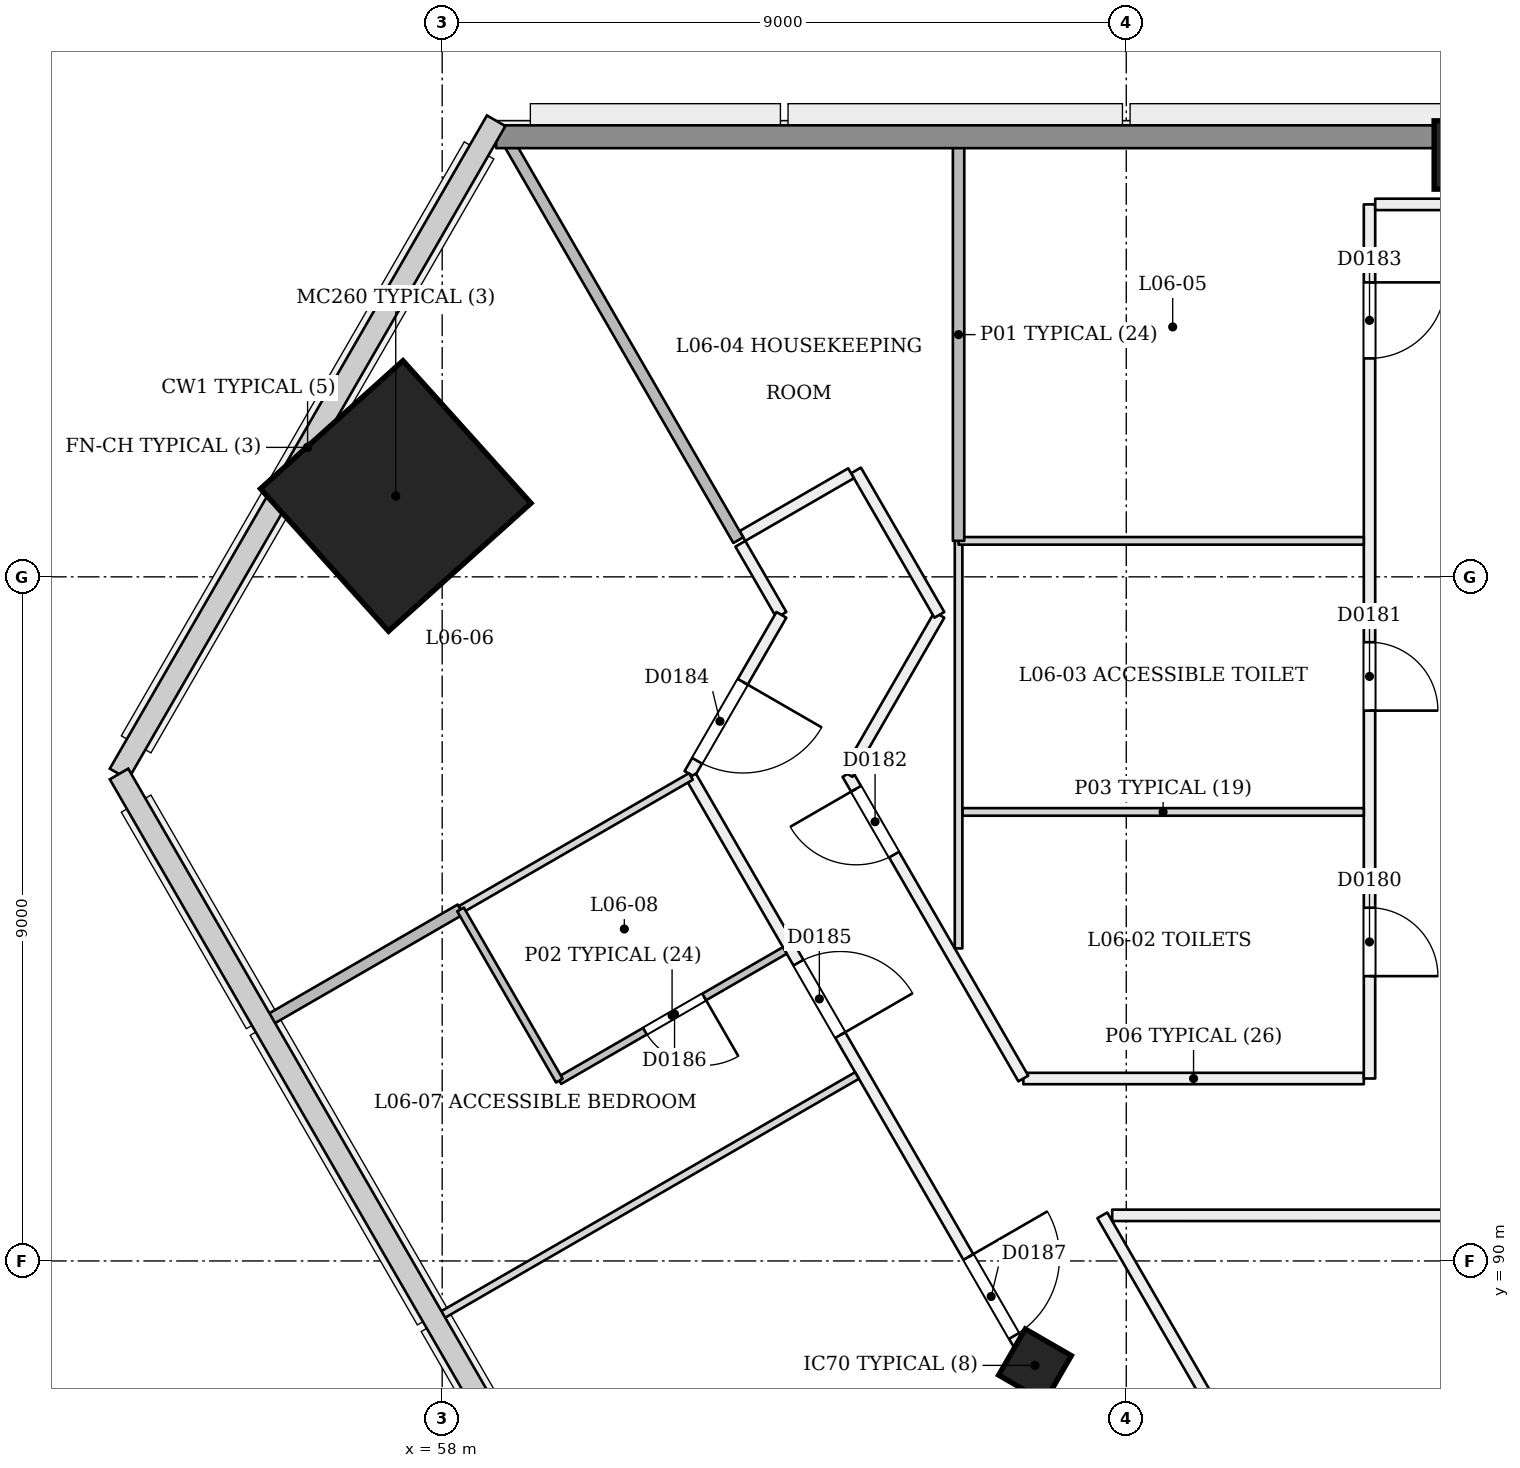
"""IFC4 building model, lengths in metres.
Left out: names, types, materials, properties, quantities, classifications, styles, units other than length and angle.
Written with IfcOpenShell. Run it as: python <this file> out.ifc"""

import sys

from ifc_helpers import new_model, si_unit, direction, frame, frame_2d, origin, origin_2d, place, context, subcontext, project, spatial, rectangle, extrude, element, fill, save


model = new_model("IFC4")
c1 = context("Model", 3, precision=1e-05, world=origin(), true_north=direction((0.0, 1.0)))
c2 = subcontext(c1, "Body", "Model", "MODEL_VIEW")
j1 = project(units=[si_unit("LENGTHUNIT", "METRE"), si_unit("PLANEANGLEUNIT", "RADIAN")], contexts=[c1])
p1 = place(None, origin())
s1 = spatial("IfcSite", under=j1, at=p1, CompositionType="ELEMENT")
p2 = place(p1, origin())
s2 = spatial("IfcBuilding", under=s1, at=p2, CompositionType="ELEMENT")
p3 = place(p2, frame((0.0, 0.0, 30.6)))
s3 = spatial("IfcBuildingStorey", under=s2, at=p3, CompositionType="ELEMENT", Elevation=30.6)
p4 = place(p3, frame((65.772, 88.579, -0.021), z_axis=(0.02215519141, 0.038415882353, 0.999016199807), x_axis=(-0.865361939077, -0.499673629592, 0.038405446053)))
e1 = element("IfcColumn", 1, at=p4, inside=s3, PredefinedType="COLUMN", context=c2, shape_type="SweptSolid", body=[
    extrude(rectangle(XDim=0.7, YDim=0.7, at=origin_2d()), origin(), (0.0, 0.0, 1.0), 3.604),
])
p5 = place(p3, frame((57.355, 100.053, 0.0), z_axis=(0.028403739082, 0.009219352065, 0.999554016126), x_axis=(-0.865122960307, 0.501162461288, 0.019961236055)))
e2 = element("IfcColumn", 2, at=p5, inside=s3, PredefinedType="COLUMN", context=c2, shape_type="SweptSolid", body=[
    extrude(rectangle(XDim=2.52, YDim=2.52, at=origin_2d()), origin(), (0.0, 0.0, 1.0), 3.602),
])
p6 = place(p3, frame((71.5, 104.55, 0.0), z_axis=(0.0, 0.0, 1.0), x_axis=(1.0, 0.0, 0.0)))
e3 = element("IfcColumn", 3, at=p6, inside=s3, PredefinedType="COLUMN", context=c2, shape_type="SweptSolid", body=[
    extrude(rectangle(XDim=0.9, YDim=0.9, at=origin_2d()), origin(), (0.0, 0.0, 1.0), 3.6),
])
p7 = place(p3, frame((70.125, 92.4, 0.0), z_axis=(0.0, 0.0, 1.0), x_axis=(-1.0, 0.0, 0.0)))
e4 = element("IfcWall", 4, at=p7, inside=s3, PredefinedType="PARTITIONING", context=c2, shape_type="SweptSolid", body=[
    extrude(rectangle(XDim=4.479, YDim=0.15, at=frame_2d((2.24, 0.0))), origin(), (0.0, 0.0, 1.0), 3.1),
])
p8 = place(p3, frame((70.2, 103.9, 0.0), z_axis=(0.0, 0.0, 1.0), x_axis=(0.0, -1.0, 0.0)))
e5 = element("IfcWall", 5, at=p8, inside=s3, PredefinedType="PARTITIONING", context=c2, shape_type="SweptSolid", body=[
    extrude(rectangle(XDim=11.5, YDim=0.15, at=frame_2d((5.75, 0.0))), origin(), (0.0, 0.0, 1.0), 2.6),
])
p9 = place(p8, frame((9.253, 0.0, 0.0)))
e6 = element("IfcOpeningElement", 6, at=p9, cuts=e5, PredefinedType="OPENING", context=c2, shape_type="SweptSolid", body=[
    extrude(rectangle(XDim=0.9, YDim=2.1, at=frame_2d((0.45, 1.05))), frame((0.0, 0.085, 0.0), z_axis=(0.0, -1.0, 0.0), x_axis=(1.0, 0.0, 0.0)), (0.0, 0.0, 1.0), 0.171),
])
p10 = place(p8, frame((5.76, 0.0, 0.0)))
e7 = element("IfcOpeningElement", 7, at=p10, cuts=e5, PredefinedType="OPENING", context=c2, shape_type="SweptSolid", body=[
    extrude(rectangle(XDim=0.9, YDim=2.1, at=frame_2d((0.45, 1.05))), frame((0.0, 0.085, 0.0), z_axis=(0.0, -1.0, 0.0), x_axis=(1.0, 0.0, 0.0)), (0.0, 0.0, 1.0), 0.171),
])
p11 = place(p8, frame((1.026, 0.0, 0.0)))
e8 = element("IfcOpeningElement", 8, at=p11, cuts=e5, PredefinedType="OPENING", context=c2, shape_type="SweptSolid", body=[
    extrude(rectangle(XDim=1.0, YDim=2.1, at=frame_2d((0.5, 1.05))), frame((0.0, 0.085, 0.0), z_axis=(0.0, -1.0, 0.0), x_axis=(1.0, 0.0, 0.0)), (0.0, 0.0, 1.0), 0.171),
])
p12 = place(p3, frame((65.646, 92.4, 0.0), z_axis=(0.0, 0.0, 1.0), x_axis=(-0.499964565595, 0.866045860881, 0.0)))
e9 = element("IfcWall", 9, at=p12, inside=s3, PredefinedType="PARTITIONING", context=c2, shape_type="SweptSolid", body=[
    extrude(rectangle(XDim=4.626, YDim=0.15, at=frame_2d((2.313, 0.0))), origin(), (0.0, 0.0, 1.0), 3.1),
])
p13 = place(p12, frame((3.401, 0.0, 0.0)))
e10 = element("IfcOpeningElement", 10, at=p13, cuts=e9, PredefinedType="OPENING", context=c2, shape_type="SweptSolid", body=[
    extrude(rectangle(XDim=1.0, YDim=2.1, at=frame_2d((0.5, 1.05))), frame((0.0, 0.085, 0.0), z_axis=(0.0, -1.0, 0.0), x_axis=(1.0, 0.0, 0.0)), (0.0, 0.0, 1.0), 0.171),
])
p14 = place(p3, frame((63.333, 96.406, 0.0), z_axis=(0.0, 0.0, 1.0), x_axis=(0.500016772967, 0.866015719691, 0.0)))
e11 = element("IfcWall", 11, at=p14, inside=s3, PredefinedType="PARTITIONING", context=c2, shape_type="SweptSolid", body=[
    extrude(rectangle(XDim=2.417, YDim=0.15, at=frame_2d((1.209, 0.0))), origin(), (0.0, 0.0, 1.0), 3.1),
])
p15 = place(p3, frame((64.541, 98.5, 0.0), z_axis=(0.0, 0.0, 1.0), x_axis=(-0.500005024956, 0.866022502605, 0.0)))
e12 = element("IfcWall", 12, at=p15, inside=s3, PredefinedType="PARTITIONING", context=c2, shape_type="SweptSolid", body=[
    extrude(rectangle(XDim=2.194, YDim=0.15, at=frame_2d((1.097, 0.0))), origin(), (0.0, 0.0, 1.0), 3.1),
])
p16 = place(p3, frame((63.379, 100.363, 0.0), z_axis=(0.0, 0.0, 1.0), x_axis=(-0.866003217194, -0.500038426333, 0.0)))
e13 = element("IfcWall", 13, at=p16, inside=s3, PredefinedType="PARTITIONING", context=c2, shape_type="SweptSolid", body=[
    extrude(rectangle(XDim=1.65, YDim=0.15, at=frame_2d((0.825, 0.0))), origin(), (0.0, 0.0, 1.0), 3.1),
])
p17 = place(p3, frame((72.0, 103.9, 0.0), z_axis=(0.0, 0.0, 1.0), x_axis=(-1.0, 0.0, 0.0)))
e14 = element("IfcWall", 14, at=p17, inside=s3, PredefinedType="PARTITIONING", context=c2, shape_type="SweptSolid", body=[
    extrude(rectangle(XDim=1.725, YDim=0.15, at=frame_2d((0.863, 0.0))), origin(), (0.0, 0.0, 1.0), 2.6),
])
p18 = place(p3, frame((61.923, 99.435, 0.0), z_axis=(0.0, 0.0, 1.0), x_axis=(0.499957341738, -0.866050031143, 0.0)))
e15 = element("IfcWall", 15, at=p18, inside=s3, PredefinedType="PARTITIONING", context=c2, shape_type="SweptSolid", body=[
    extrude(rectangle(XDim=1.08, YDim=0.15, at=frame_2d((0.54, 0.0))), origin(), (0.0, 0.0, 1.0), 3.1),
])
p19 = place(p3, frame((62.463, 98.5, 0.0), z_axis=(0.0, 0.0, 1.0), x_axis=(-0.500016772967, -0.866015719691, 0.0)))
e16 = element("IfcWall", 16, at=p19, inside=s3, PredefinedType="PARTITIONING", context=c2, shape_type="SweptSolid", body=[
    extrude(rectangle(XDim=2.417, YDim=0.15, at=frame_2d((1.209, 0.0))), origin(), (0.0, 0.0, 1.0), 3.1),
])
p20 = place(p19, frame((1.017, 0.0, 0.0)))
e17 = element("IfcOpeningElement", 17, at=p20, cuts=e16, PredefinedType="OPENING", context=c2, shape_type="SweptSolid", body=[
    extrude(rectangle(XDim=1.2, YDim=2.1, at=frame_2d((0.6, 1.05))), frame((0.0, 0.085, 0.0), z_axis=(0.0, -1.0, 0.0), x_axis=(1.0, 0.0, 0.0)), (0.0, 0.0, 1.0), 0.171),
])
p21 = place(p3, frame((61.273, 96.374, 0.0), z_axis=(0.0, 0.0, 1.0), x_axis=(0.5000018851, -0.866024315419, 0.0)))
e18 = element("IfcWall", 18, at=p21, inside=s3, PredefinedType="PARTITIONING", context=c2, shape_type="SweptSolid", body=[
    extrude(rectangle(XDim=45.0, YDim=0.15, at=frame_2d((22.5, 0.0))), origin(), (0.0, 0.0, 1.0), 2.7),
])
p22 = place(p21, frame((2.829, 0.0, 0.0)))
e19 = element("IfcOpeningElement", 19, at=p22, cuts=e18, PredefinedType="OPENING", context=c2, shape_type="SweptSolid", body=[
    extrude(rectangle(XDim=1.1, YDim=2.1, at=frame_2d((0.55, 1.05))), frame((0.0, 0.085, 0.0), z_axis=(0.0, -1.0, 0.0), x_axis=(1.0, 0.0, 0.0)), (0.0, 0.0, 1.0), 0.171),
])
p23 = place(p21, frame((7.3, 0.0, 0.0)))
e20 = element("IfcOpeningElement", 20, at=p23, cuts=e18, PredefinedType="OPENING", context=c2, shape_type="SweptSolid", body=[
    extrude(rectangle(XDim=1.2, YDim=2.1, at=frame_2d((0.6, 1.05))), frame((0.0, 0.085, 0.0), z_axis=(0.0, -1.0, 0.0), x_axis=(1.0, 0.0, 0.0)), (0.0, 0.0, 1.0), 0.171),
])
p24 = place(p21, frame((14.22, 0.0, 0.0)))
e21 = element("IfcOpeningElement", 21, at=p24, cuts=e18, PredefinedType="OPENING", context=c2, shape_type="SweptSolid", body=[
    extrude(rectangle(XDim=1.0, YDim=2.1, at=frame_2d((0.5, 1.05))), frame((0.0, 0.085, 0.0), z_axis=(0.0, -1.0, 0.0), x_axis=(1.0, 0.0, 0.0)), (0.0, 0.0, 1.0), 0.171),
])
p25 = place(p21, frame((20.895, 0.0, 0.0)))
e22 = element("IfcOpeningElement", 22, at=p25, cuts=e18, PredefinedType="OPENING", context=c2, shape_type="SweptSolid", body=[
    extrude(rectangle(XDim=1.0, YDim=2.1, at=frame_2d((0.5, 1.05))), frame((0.0, 0.085, 0.0), z_axis=(0.0, -1.0, 0.0), x_axis=(1.0, 0.0, 0.0)), (0.0, 0.0, 1.0), 0.171),
])
p26 = place(p21, frame((24.25, 0.0, 0.0)))
e23 = element("IfcOpeningElement", 23, at=p26, cuts=e18, PredefinedType="OPENING", context=c2, shape_type="SweptSolid", body=[
    extrude(rectangle(XDim=1.0, YDim=2.1, at=frame_2d((0.5, 1.05))), frame((0.0, 0.085, 0.0), z_axis=(0.0, -1.0, 0.0), x_axis=(1.0, 0.0, 0.0)), (0.0, 0.0, 1.0), 0.171),
])
p27 = place(p21, frame((29.78, 0.0, 0.0)))
e24 = element("IfcOpeningElement", 24, at=p27, cuts=e18, PredefinedType="OPENING", context=c2, shape_type="SweptSolid", body=[
    extrude(rectangle(XDim=1.0, YDim=2.1, at=frame_2d((0.5, 1.05))), frame((0.0, 0.085, 0.0), z_axis=(0.0, -1.0, 0.0), x_axis=(1.0, 0.0, 0.0)), (0.0, 0.0, 1.0), 0.171),
])
p28 = place(p21, frame((34.3, 0.0, 0.0)))
e25 = element("IfcOpeningElement", 25, at=p28, cuts=e18, PredefinedType="OPENING", context=c2, shape_type="SweptSolid", body=[
    extrude(rectangle(XDim=1.2, YDim=2.1, at=frame_2d((0.6, 1.05))), frame((0.0, 0.085, 0.0), z_axis=(0.0, -1.0, 0.0), x_axis=(1.0, 0.0, 0.0)), (0.0, 0.0, 1.0), 0.171),
])
p29 = place(p21, frame((41.22, 0.0, 0.0)))
e26 = element("IfcOpeningElement", 26, at=p29, cuts=e18, PredefinedType="OPENING", context=c2, shape_type="SweptSolid", body=[
    extrude(rectangle(XDim=1.0, YDim=2.1, at=frame_2d((0.5, 1.05))), frame((0.0, 0.085, 0.0), z_axis=(0.0, -1.0, 0.0), x_axis=(1.0, 0.0, 0.0)), (0.0, 0.0, 1.0), 0.171),
])
p30 = place(p3, frame((84.831, 59.171, 0.0), z_axis=(0.0, 0.0, 1.0), x_axis=(-0.499999056994, 0.866025948229, 0.0)))
e27 = element("IfcWall", 27, at=p30, inside=s3, PredefinedType="PARTITIONING", context=c2, shape_type="SweptSolid", body=[
    extrude(rectangle(XDim=36.292, YDim=0.15, at=frame_2d((18.146, 0.0))), origin(), (0.0, 0.0, 1.0), 3.1),
])
p31 = place(p30, frame((16.276, 0.0, 0.0)))
e28 = element("IfcOpeningElement", 28, at=p31, cuts=e27, PredefinedType="OPENING", context=c2, shape_type="SweptSolid", body=[
    extrude(rectangle(XDim=1.2, YDim=2.1, at=frame_2d((0.6, 1.05))), frame((0.0, 0.085, 0.0), z_axis=(0.0, -1.0, 0.0), x_axis=(1.0, 0.0, 0.0)), (0.0, 0.0, 1.0), 0.171),
])
p32 = place(p30, frame((27.931, 0.0, 0.0)))
e29 = element("IfcOpeningElement", 29, at=p32, cuts=e27, PredefinedType="OPENING", context=c2, shape_type="SweptSolid", body=[
    extrude(rectangle(XDim=1.2, YDim=2.1, at=frame_2d((0.6, 1.05))), frame((0.0, 0.085, 0.0), z_axis=(0.0, -1.0, 0.0), x_axis=(1.0, 0.0, 0.0)), (0.0, 0.0, 1.0), 0.171),
])
p33 = place(p3, frame((66.815, 90.6, 0.0), z_axis=(0.0, 0.0, 1.0), x_axis=(0.999999997932, -6.4309715e-05, 0.0)))
e30 = element("IfcWall", 30, at=p33, inside=s3, PredefinedType="PARTITIONING", context=c2, shape_type="SweptSolid", body=[
    extrude(rectangle(XDim=15.185, YDim=0.15, at=frame_2d((7.593, 0.0))), origin(), (0.0, 0.0, 1.0), 3.1),
])
p34 = place(p33, frame((11.492, 0.0, 0.0)))
e31 = element("IfcOpeningElement", 31, at=p34, cuts=e30, PredefinedType="OPENING", context=c2, shape_type="SweptSolid", body=[
    extrude(rectangle(XDim=1.2, YDim=2.1, at=frame_2d((0.6, 1.05))), frame((0.0, 0.085, 0.0), z_axis=(0.0, -1.0, 0.0), x_axis=(1.0, 0.0, 0.0)), (0.0, 0.0, 1.0), 0.171),
])
p35 = place(p3, frame((70.125, 95.907, 0.0), z_axis=(0.0, 0.0, 1.0), x_axis=(-1.0, 0.0, 0.0)))
e32 = element("IfcWall", 32, at=p35, inside=s3, PredefinedType="PARTITIONING", context=c2, shape_type="SweptSolid", body=[
    extrude(rectangle(XDim=5.281, YDim=0.1, at=frame_2d((2.641, 0.0))), origin(), (0.0, 0.0, 1.0), 3.1),
])
p36 = place(p3, frame((64.794, 99.493, 0.0), z_axis=(0.0, 0.0, 1.0), x_axis=(0.0, -1.0, 0.0)))
e33 = element("IfcWall", 33, at=p36, inside=s3, PredefinedType="PARTITIONING", context=c2, shape_type="SweptSolid", body=[
    extrude(rectangle(XDim=5.381, YDim=0.1, at=frame_2d((2.691, 0.0))), origin(), (0.0, 0.0, 1.0), 3.1),
])
p37 = place(p3, frame((70.125, 99.474, 0.0), z_axis=(0.0, 0.0, 1.0), x_axis=(-1.0, 0.0, 0.0)))
e34 = element("IfcWall", 34, at=p37, inside=s3, PredefinedType="PARTITIONING", context=c2, shape_type="SweptSolid", body=[
    extrude(rectangle(XDim=5.331, YDim=0.1, at=frame_2d((2.666, 0.0))), origin(), (0.0, 0.0, 1.0), 3.1),
])
p38 = place(p3, frame((64.794, 99.474, 0.0), z_axis=(0.0, 0.0, 1.0), x_axis=(0.0, 1.0, 0.0)))
e35 = element("IfcWall", 35, at=p38, inside=s3, PredefinedType="PARTITIONING", context=c2, shape_type="SweptSolid", body=[
    extrude(rectangle(XDim=5.426, YDim=0.15, at=frame_2d((2.713, 0.0))), origin(), (0.0, 0.0, 1.0), 2.6),
])
p39 = place(p3, frame((58.768, 104.9, 0.0), z_axis=(0.0, 0.0, 1.0), x_axis=(0.500005118993, -0.866022448312, 0.0)))
e36 = element("IfcWall", 36, at=p39, inside=s3, PredefinedType="PARTITIONING", context=c2, shape_type="SweptSolid", body=[
    extrude(rectangle(XDim=6.255, YDim=0.15, at=frame_2d((3.128, 0.0))), origin(), (0.0, 0.0, 1.0), 2.6),
])
p40 = place(p3, frame((55.713, 93.164, 0.0), z_axis=(0.0, 0.0, 1.0), x_axis=(0.866032430508, 0.49998782916, 0.0)))
e37 = element("IfcWall", 37, at=p40, inside=s3, PredefinedType="PARTITIONING", context=c2, shape_type="SweptSolid", body=[
    extrude(rectangle(XDim=2.92, YDim=0.15, at=frame_2d((1.46, 0.0))), origin(), (0.0, 0.0, 1.0), 3.1),
])
p41 = place(p3, frame((58.241, 94.624, 0.0), z_axis=(0.0, 0.0, 1.0), x_axis=(0.866036909293, 0.499980071345, 0.0)))
e38 = element("IfcWall", 38, at=p41, inside=s3, PredefinedType="PARTITIONING", context=c2, shape_type="SweptSolid", body=[
    extrude(rectangle(XDim=3.5, YDim=0.1, at=frame_2d((1.75, 0.0))), origin(), (0.0, 0.0, 1.0), 2.6),
])
p42 = place(p3, frame((62.508, 94.085, 0.0), z_axis=(0.0, 0.0, 1.0), x_axis=(-0.866032454348, -0.499987787867, 0.0)))
e39 = element("IfcWall", 39, at=p42, inside=s3, PredefinedType="PARTITIONING", context=c2, shape_type="SweptSolid", body=[
    extrude(rectangle(XDim=3.425, YDim=0.1, at=frame_2d((1.712, 0.0))), origin(), (0.0, 0.0, 1.0), 3.1),
])
p43 = place(p42, frame((1.225, 0.0, 0.0)))
e40 = element("IfcOpeningElement", 40, at=p43, cuts=e39, PredefinedType="OPENING", context=c2, shape_type="SweptSolid", body=[
    extrude(rectangle(XDim=0.9, YDim=2.1, at=frame_2d((0.45, 1.05))), frame((0.0, 0.061, 0.0), z_axis=(0.0, -1.0, 0.0), x_axis=(1.0, 0.0, 0.0)), (0.0, 0.0, 1.0), 0.121),
])
p44 = place(p3, frame((59.542, 92.373, 0.0), z_axis=(0.0, 0.0, 1.0), x_axis=(-0.500047596559, 0.865997922154, 0.0)))
e41 = element("IfcWall", 41, at=p44, inside=s3, PredefinedType="PARTITIONING", context=c2, shape_type="SweptSolid", body=[
    extrude(rectangle(XDim=2.6, YDim=0.1, at=frame_2d((1.3, 0.0))), origin(), (0.0, 0.0, 1.0), 2.6),
])
p45 = place(p3, frame((57.963, 89.267, 0.0), z_axis=(0.0, 0.0, 1.0), x_axis=(0.866025401434, 0.500000004071, 0.0)))
e42 = element("IfcWall", 42, at=p45, inside=s3, PredefinedType="PARTITIONING", context=c2, shape_type="SweptSolid", body=[
    extrude(rectangle(XDim=6.345, YDim=0.1, at=frame_2d((3.173, 0.0))), origin(), (0.0, 0.0, 1.0), 2.6),
])
p46 = place(p3, frame((58.71, 104.79, 0.0), z_axis=(0.0, 0.0, 1.0), x_axis=(1.0, 0.0, 0.0)))
e43 = element("IfcWall", 43, at=p46, inside=s3, PredefinedType="SOLIDWALL", context=c2, shape_type="SweptSolid", body=[
    extrude(rectangle(XDim=52.58, YDim=0.3, at=frame_2d((26.29, 0.0))), origin(), (0.0, 0.0, 1.0), 2.6),
])
p47 = place(p9, origin())
e44 = element("IfcDoor", 44, at=p47, inside=s3, OperationType="SINGLE_SWING_RIGHT", PredefinedType="NOTDEFINED", context=c2, shape_type="SweptSolid", body=[
    extrude(rectangle(XDim=0.9, YDim=2.1, at=frame_2d((0.45, 1.05))), frame((0.0, 0.025, 0.0), z_axis=(0.0, -1.0, 0.0), x_axis=(1.0, 0.0, 0.0)), (0.0, 0.0, 1.0), 0.05),
])
fill(e6, e44)
p48 = place(p10, origin())
e45 = element("IfcDoor", 45, at=p48, inside=s3, OperationType="SINGLE_SWING_RIGHT", PredefinedType="NOTDEFINED", context=c2, shape_type="SweptSolid", body=[
    extrude(rectangle(XDim=0.9, YDim=2.1, at=frame_2d((0.45, 1.05))), frame((0.0, 0.025, 0.0), z_axis=(0.0, -1.0, 0.0), x_axis=(1.0, 0.0, 0.0)), (0.0, 0.0, 1.0), 0.05),
])
fill(e7, e45)
p49 = place(p13, origin())
e46 = element("IfcDoor", 46, at=p49, inside=s3, OperationType="SINGLE_SWING_RIGHT", PredefinedType="NOTDEFINED", context=c2, shape_type="SweptSolid", body=[
    extrude(rectangle(XDim=1.0, YDim=2.1, at=frame_2d((0.5, 1.05))), frame((0.0, 0.025, 0.0), z_axis=(0.0, -1.0, 0.0), x_axis=(1.0, 0.0, 0.0)), (0.0, 0.0, 1.0), 0.05),
])
fill(e10, e46)
p50 = place(p11, origin())
e47 = element("IfcDoor", 47, at=p50, inside=s3, OperationType="SINGLE_SWING_LEFT", PredefinedType="NOTDEFINED", context=c2, shape_type="SweptSolid", body=[
    extrude(rectangle(XDim=1.0, YDim=2.1, at=frame_2d((0.5, 1.05))), frame((0.0, 0.025, 0.0), z_axis=(0.0, -1.0, 0.0), x_axis=(1.0, 0.0, 0.0)), (0.0, 0.0, 1.0), 0.05),
])
fill(e8, e47)
p51 = place(p20, origin())
e48 = element("IfcDoor", 48, at=p51, inside=s3, OperationType="SINGLE_SWING_LEFT", PredefinedType="NOTDEFINED", context=c2, shape_type="SweptSolid", body=[
    extrude(rectangle(XDim=1.2, YDim=2.1, at=frame_2d((0.6, 1.05))), frame((0.0, 0.025, 0.0), z_axis=(0.0, -1.0, 0.0), x_axis=(1.0, 0.0, 0.0)), (0.0, 0.0, 1.0), 0.05),
])
fill(e17, e48)
p52 = place(p22, origin())
e49 = element("IfcDoor", 49, at=p52, inside=s3, OperationType="SINGLE_SWING_RIGHT", PredefinedType="NOTDEFINED", context=c2, shape_type="SweptSolid", body=[
    extrude(rectangle(XDim=1.1, YDim=2.1, at=frame_2d((0.55, 1.05))), frame((0.0, 0.025, 0.0), z_axis=(0.0, -1.0, 0.0), x_axis=(1.0, 0.0, 0.0)), (0.0, 0.0, 1.0), 0.05),
])
fill(e19, e49)
p53 = place(p43, origin())
e50 = element("IfcDoor", 50, at=p53, inside=s3, OperationType="SINGLE_SWING_LEFT", PredefinedType="NOTDEFINED", context=c2, shape_type="SweptSolid", body=[
    extrude(rectangle(XDim=0.9, YDim=2.1, at=frame_2d((0.45, 1.05))), frame((0.0, 0.025, 0.0), z_axis=(0.0, -1.0, 0.0), x_axis=(1.0, 0.0, 0.0)), (0.0, 0.0, 1.0), 0.05),
])
fill(e40, e50)
p54 = place(p23, origin())
e51 = element("IfcDoor", 51, at=p54, inside=s3, OperationType="SINGLE_SWING_LEFT", PredefinedType="NOTDEFINED", context=c2, shape_type="SweptSolid", body=[
    extrude(rectangle(XDim=1.2, YDim=2.1, at=frame_2d((0.6, 1.05))), frame((0.0, 0.025, 0.0), z_axis=(0.0, -1.0, 0.0), x_axis=(1.0, 0.0, 0.0)), (0.0, 0.0, 1.0), 0.05),
])
fill(e20, e51)
save(model, sys.argv[1])
